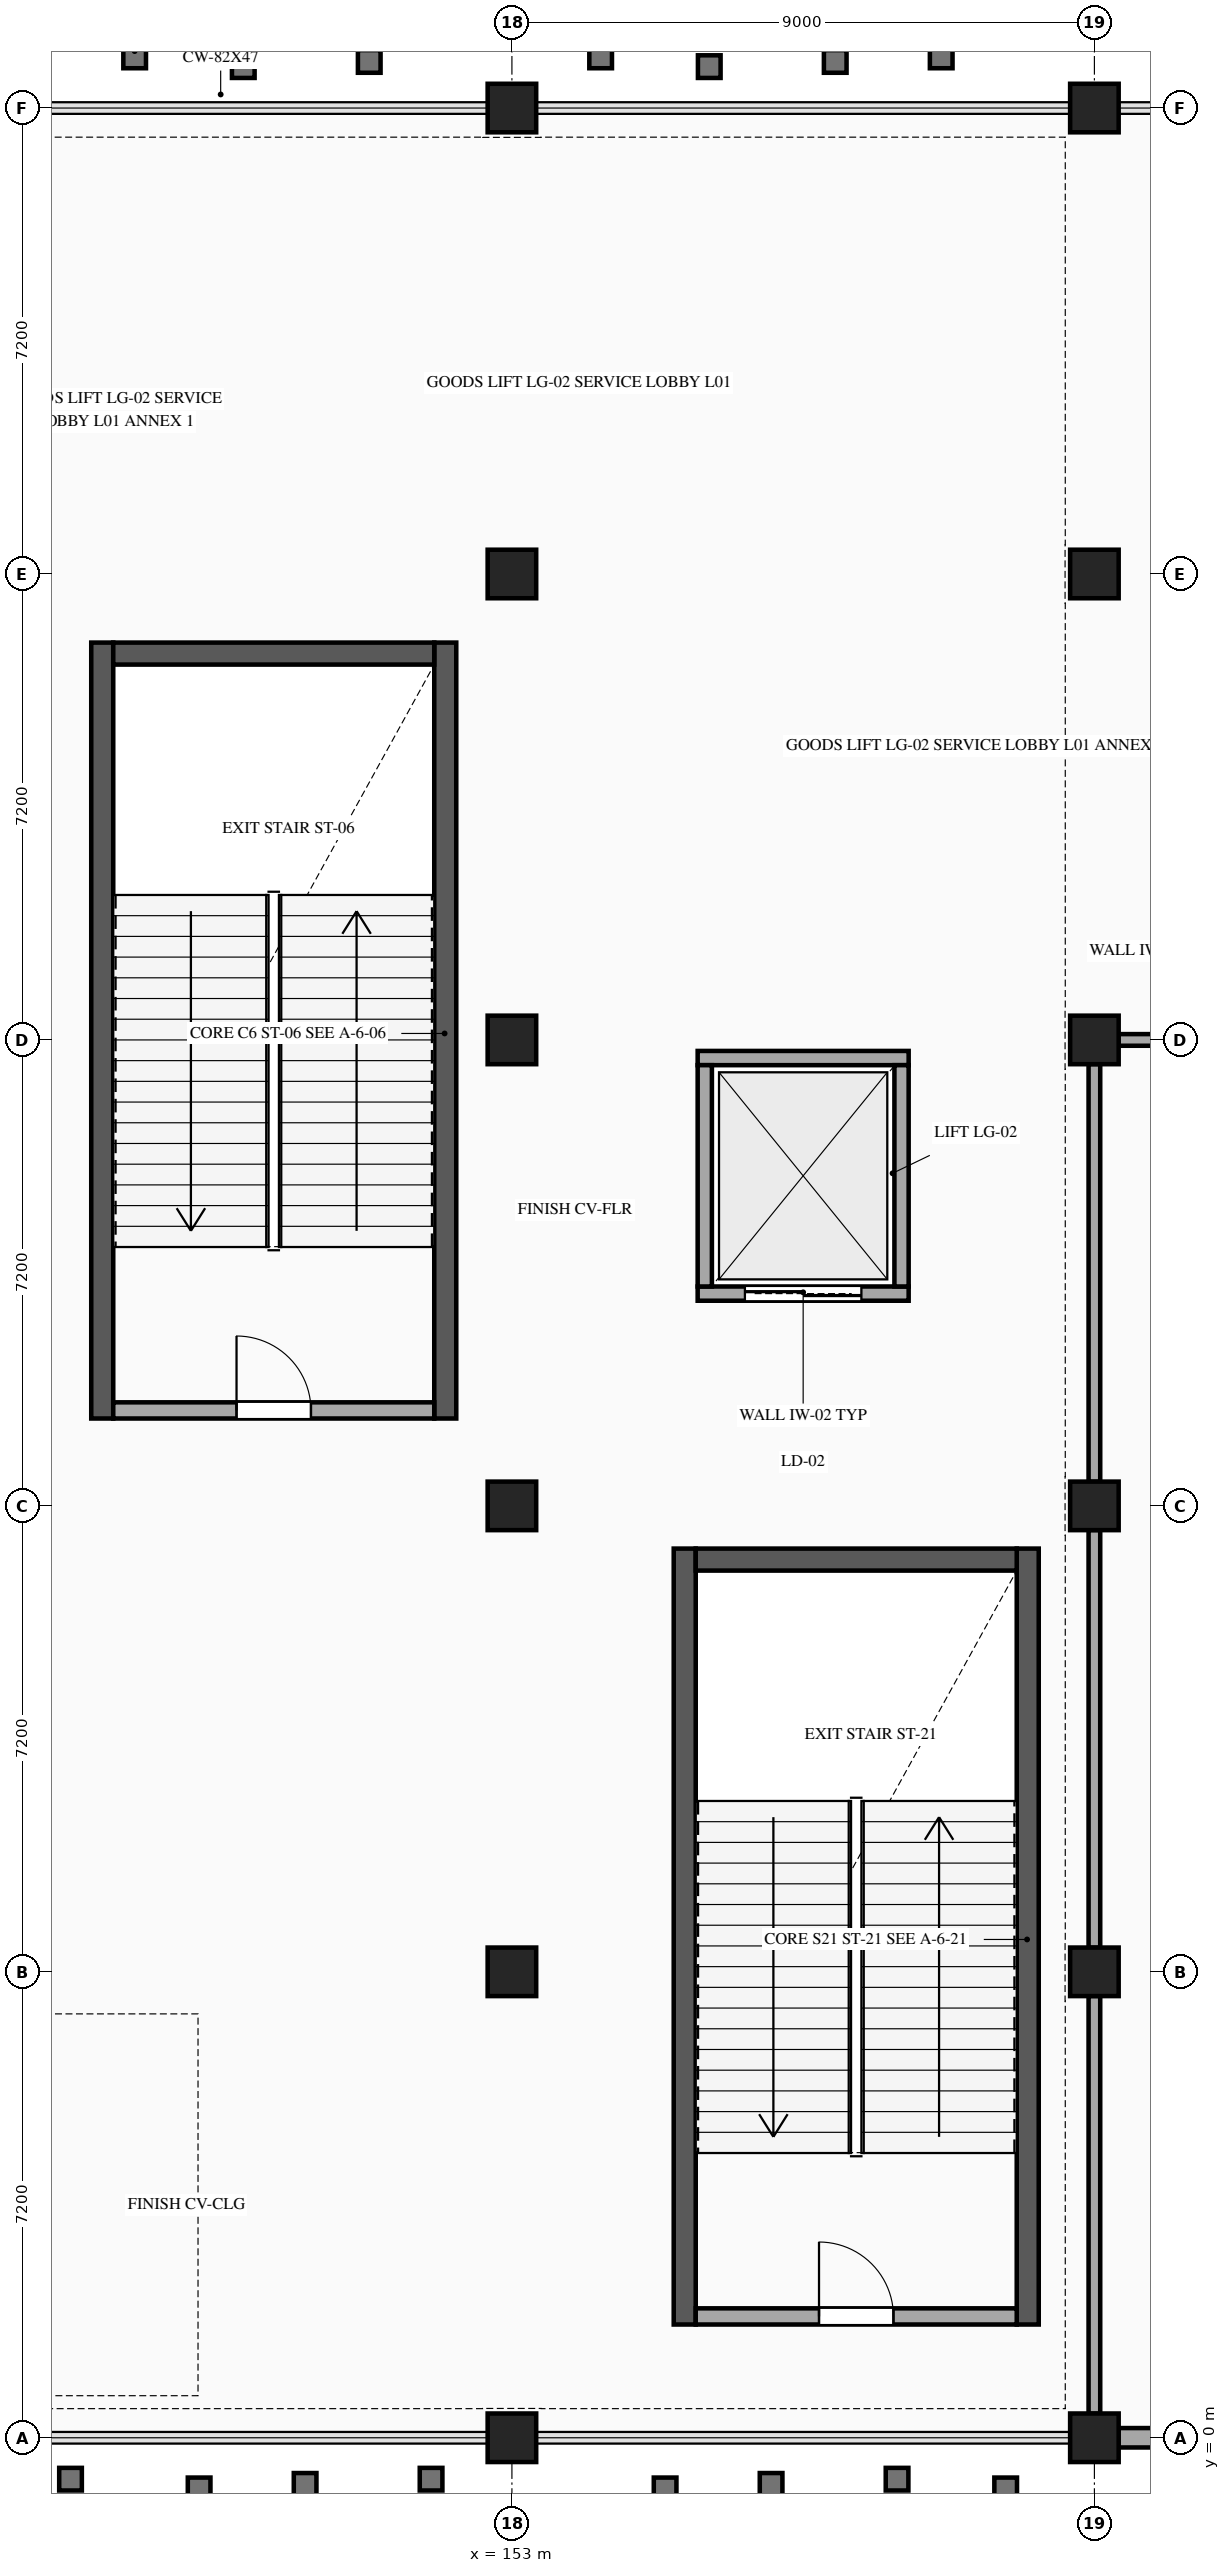
"""IFC4 building model, lengths in metres.
Left out: names, types, materials, properties, quantities, classifications, styles, units other than length and angle.
Written with IfcOpenShell. Run it as: python <this file> out.ifc"""

import sys

from ifc_helpers import new_model, si_unit, direction, frame, frame_2d, origin, origin_2d, place, context, subcontext, project, spatial, rectangle, extrude, element, fill, save


model = new_model("IFC4")
c1 = context("Model", 3, precision=1e-05, world=origin(), true_north=direction((0.0, 1.0)))
c2 = subcontext(c1, "Body", "Model", "MODEL_VIEW")
j1 = project(units=[si_unit("LENGTHUNIT", "METRE"), si_unit("PLANEANGLEUNIT", "RADIAN")], contexts=[c1])
p1 = place(None, origin())
s1 = spatial("IfcSite", under=j1, at=p1, CompositionType="ELEMENT")
p2 = place(p1, origin())
s2 = spatial("IfcBuilding", under=s1, at=p2, CompositionType="ELEMENT")
p3 = place(p2, frame((0.0, 0.0, 5.4)))
s3 = spatial("IfcBuildingStorey", under=s2, at=p3, CompositionType="ELEMENT", Elevation=5.4)
for number, where, z_axis, x_axis in (
    (1, (153.0, 0.0, 0.0), (0.0, 0.0, 1.0), (1.0, 0.0, 0.0)),
    (2, (153.0, 7.2, 0.0), (0.0, 0.0, 1.0), (1.0, 0.0, 0.0)),
    (3, (153.0, 14.4, 0.0), (0.0, 0.0, 1.0), (1.0, 0.0, 0.0)),
    (4, (153.0, 21.6, 0.0), (0.0, 0.0, 1.0), (1.0, 0.0, 0.0)),
    (5, (153.0, 28.8, 0.0), (0.0, 0.0, 1.0), (1.0, 0.0, 0.0)),
    (6, (153.0, 36.0, 0.0), (0.0, 0.0, 1.0), (1.0, 0.0, 0.0)),
    (7, (162.0, 0.0, 0.0), (0.0, 0.0, 1.0), (1.0, 0.0, 0.0)),
    (8, (162.0, 7.2, 0.0), (0.0, 0.0, 1.0), (1.0, 0.0, 0.0)),
    (9, (162.0, 14.4, 0.0), (0.0, 0.0, 1.0), (1.0, 0.0, 0.0)),
    (10, (162.0, 21.6, 0.0), (0.0, 0.0, 1.0), (1.0, 0.0, 0.0)),
    (11, (162.0, 28.8, 0.0), (0.0, 0.0, 1.0), (1.0, 0.0, 0.0)),
    (12, (162.0, 36.0, 0.0), (0.0, 0.0, 1.0), (1.0, 0.0, 0.0)),
):
    element("IfcColumn", number, at=place(p3, frame(where, z_axis=z_axis, x_axis=x_axis)), inside=s3, PredefinedType="COLUMN", context=c2, shape_type="SweptSolid", body=[
        extrude(rectangle(XDim=0.75, YDim=0.75, at=origin_2d()), origin(), (0.0, 0.0, 1.0), 5.4),
    ])
for number, where, z_axis, x_axis in (
    (13, (146.67, 15.75, 0.0), (0.0, 0.0, 1.0), (0.0, 1.0, 0.0)),
    (14, (151.97, 27.74, 0.0), (0.0, 0.0, 1.0), (0.0, -1.0, 0.0)),
):
    element("IfcWall", number, at=place(p3, frame(where, z_axis=z_axis, x_axis=x_axis)), inside=s3, PredefinedType="SHEAR", context=c2, shape_type="SweptSolid", body=[
        extrude(rectangle(XDim=11.99, YDim=0.34, at=frame_2d((5.995, 0.0))), origin(), (0.0, 0.0, 1.0), 5.12),
    ])
p4 = place(p3, frame((146.84, 27.57, 0.0), z_axis=(0.0, 0.0, 1.0), x_axis=(1.0, 0.0, 0.0)))
e15 = element("IfcWall", 15, at=p4, inside=s3, PredefinedType="SHEAR", context=c2, shape_type="SweptSolid", body=[
    extrude(rectangle(XDim=4.96, YDim=0.34, at=frame_2d((2.48, 0.0))), origin(), (0.0, 0.0, 1.0), 5.12),
])
for number, where, z_axis, x_axis in (
    (16, (155.67, 1.75, 0.0), (0.0, 0.0, 1.0), (0.0, 1.0, 0.0)),
    (17, (160.97, 13.74, 0.0), (0.0, 0.0, 1.0), (0.0, -1.0, 0.0)),
):
    element("IfcWall", number, at=place(p3, frame(where, z_axis=z_axis, x_axis=x_axis)), inside=s3, PredefinedType="SHEAR", context=c2, shape_type="SweptSolid", body=[
        extrude(rectangle(XDim=11.99, YDim=0.34, at=frame_2d((5.995, 0.0))), origin(), (0.0, 0.0, 1.0), 5.12),
    ])
p5 = place(p3, frame((155.84, 13.57, 0.0), z_axis=(0.0, 0.0, 1.0), x_axis=(1.0, 0.0, 0.0)))
e18 = element("IfcWall", 18, at=p5, inside=s3, PredefinedType="SHEAR", context=c2, shape_type="SweptSolid", body=[
    extrude(rectangle(XDim=4.96, YDim=0.34, at=frame_2d((2.48, 0.0))), origin(), (0.0, 0.0, 1.0), 5.12),
])
p6 = place(p3, frame((170.627, 0.0, 0.0), z_axis=(0.0, 0.0, 1.0), x_axis=(-1.0, 0.0, 0.0)))
e19 = element("IfcWall", 19, at=p6, inside=s3, PredefinedType="STANDARD", context=c2, shape_type="SweptSolid", body=[
    extrude(rectangle(XDim=8.254, YDim=0.3, at=frame_2d((4.127, 0.0))), origin(), (0.0, 0.0, 1.0), 4.764),
])
p7 = place(p3, frame((146.84, 15.875, 0.0), z_axis=(0.0, 0.0, 1.0), x_axis=(1.0, 0.0, 0.0)))
e20 = element("IfcWall", 20, at=p7, inside=s3, PredefinedType="STANDARD", context=c2, shape_type="SweptSolid", body=[
    extrude(rectangle(XDim=4.96, YDim=0.25, at=frame_2d((2.48, 0.0))), origin(), (0.0, 0.0, 1.0), 5.12),
])
p8 = place(p7, frame((1.905, 0.0, 0.0)))
e21 = element("IfcOpeningElement", 21, at=p8, cuts=e20, PredefinedType="OPENING", context=c2, shape_type="SweptSolid", body=[
    extrude(rectangle(XDim=1.15, YDim=2.2, at=frame_2d((0.575, 1.1))), frame((0.0, 0.135, 0.0), z_axis=(0.0, -1.0, 0.0), x_axis=(1.0, 0.0, 0.0)), (0.0, 0.0, 1.0), 0.27),
])
p9 = place(p3, frame((155.87, 17.68, 0.0), z_axis=(0.0, 0.0, 1.0), x_axis=(1.0, 0.0, 0.0)))
e22 = element("IfcWall", 22, at=p9, inside=s3, PredefinedType="STANDARD", context=c2, shape_type="SweptSolid", body=[
    extrude(rectangle(XDim=3.26, YDim=0.22, at=frame_2d((1.63, 0.0))), origin(), (0.0, 0.0, 1.0), 4.764),
])
p10 = place(p9, frame((0.73, 0.0, 0.0)))
e23 = element("IfcOpeningElement", 23, at=p10, cuts=e22, PredefinedType="OPENING", context=c2, shape_type="SweptSolid", body=[
    extrude(rectangle(XDim=1.8, YDim=2.35, at=frame_2d((0.9, 1.175))), frame((0.0, 0.12, 0.0), z_axis=(0.0, -1.0, 0.0), x_axis=(1.0, 0.0, 0.0)), (0.0, 0.0, 1.0), 0.24),
])
p11 = place(p3, frame((159.13, 21.32, 0.0), z_axis=(0.0, 0.0, 1.0), x_axis=(-1.0, 0.0, 0.0)))
e24 = element("IfcWall", 24, at=p11, inside=s3, PredefinedType="STANDARD", context=c2, shape_type="SweptSolid", body=[
    extrude(rectangle(XDim=3.26, YDim=0.22, at=frame_2d((1.63, 0.0))), origin(), (0.0, 0.0, 1.0), 4.764),
])
for number, where, z_axis, x_axis in (
    (25, (155.98, 21.21, 0.0), (0.0, 0.0, 1.0), (0.0, -1.0, 0.0)),
    (26, (159.02, 17.79, 0.0), (0.0, 0.0, 1.0), (0.0, 1.0, 0.0)),
):
    element("IfcWall", number, at=place(p3, frame(where, z_axis=z_axis, x_axis=x_axis)), inside=s3, PredefinedType="STANDARD", context=c2, shape_type="SweptSolid", body=[
        extrude(rectangle(XDim=3.42, YDim=0.22, at=frame_2d((1.71, 0.0))), origin(), (0.0, 0.0, 1.0), 4.764),
    ])
p12 = place(p3, frame((155.84, 1.875, 0.0), z_axis=(0.0, 0.0, 1.0), x_axis=(1.0, 0.0, 0.0)))
e27 = element("IfcWall", 27, at=p12, inside=s3, PredefinedType="STANDARD", context=c2, shape_type="SweptSolid", body=[
    extrude(rectangle(XDim=4.96, YDim=0.25, at=frame_2d((2.48, 0.0))), origin(), (0.0, 0.0, 1.0), 5.12),
])
p13 = place(p12, frame((1.905, 0.0, 0.0)))
e28 = element("IfcOpeningElement", 28, at=p13, cuts=e27, PredefinedType="OPENING", context=c2, shape_type="SweptSolid", body=[
    extrude(rectangle(XDim=1.15, YDim=2.2, at=frame_2d((0.575, 1.1))), frame((0.0, 0.135, 0.0), z_axis=(0.0, -1.0, 0.0), x_axis=(1.0, 0.0, 0.0)), (0.0, 0.0, 1.0), 0.27),
])
p14 = place(p3, frame((162.373, 21.6, 0.0), z_axis=(0.0, 0.0, 1.0), x_axis=(1.0, 0.0, 0.0)))
e29 = element("IfcWall", 29, at=p14, inside=s3, PredefinedType="PARTITIONING", context=c2, shape_type="SweptSolid", body=[
    extrude(rectangle(XDim=3.627, YDim=0.18, at=frame_2d((1.813, 0.0))), origin(), (0.0, 0.0, 1.0), 4.264),
])
p15 = place(p14, frame((1.513, 0.0, 0.0)))
e30 = element("IfcOpeningElement", 30, at=p15, cuts=e29, PredefinedType="OPENING", context=c2, shape_type="SweptSolid", body=[
    extrude(rectangle(XDim=1.3, YDim=2.2, at=frame_2d((0.65, 1.1))), frame((0.0, 0.1, 0.0), z_axis=(0.0, -1.0, 0.0), x_axis=(1.0, 0.0, 0.0)), (0.0, 0.0, 1.0), 0.2),
])
p16 = place(p3, frame((162.0, 0.373, 0.0), z_axis=(0.0, 0.0, 1.0), x_axis=(0.0, 1.0, 0.0)))
e31 = element("IfcWall", 31, at=p16, inside=s3, PredefinedType="PARTITIONING", context=c2, shape_type="SweptSolid", body=[
    extrude(rectangle(XDim=6.454, YDim=0.18, at=frame_2d((3.227, 0.0))), origin(), (0.0, 0.0, 1.0), 4.264),
])
for number, where, z_axis, x_axis in (
    (32, (162.0, 7.573, 0.0), (0.0, 0.0, 1.0), (0.0, 1.0, 0.0)),
    (33, (162.0, 14.773, 0.0), (0.0, 0.0, 1.0), (0.0, 1.0, 0.0)),
):
    element("IfcWall", number, at=place(p3, frame(where, z_axis=z_axis, x_axis=x_axis)), inside=s3, PredefinedType="PARTITIONING", context=c2, shape_type="SweptSolid", body=[
        extrude(rectangle(XDim=6.454, YDim=0.18, at=frame_2d((3.227, 0.0))), origin(), (0.0, 0.0, 1.0), 4.264),
    ])
p17 = place(p8, origin())
e34 = element("IfcDoor", 34, at=p17, inside=s3, OperationType="SINGLE_SWING_LEFT", PredefinedType="DOOR", context=c2, shape_type="SweptSolid", body=[
    extrude(rectangle(XDim=1.15, YDim=2.2, at=frame_2d((0.575, 1.1))), frame((0.0, 0.025, 0.0), z_axis=(0.0, -1.0, 0.0), x_axis=(1.0, 0.0, 0.0)), (0.0, 0.0, 1.0), 0.05),
])
fill(e21, e34)
p18 = place(p10, origin())
e35 = element("IfcDoor", 35, at=p18, inside=s3, OperationType="DOUBLE_DOOR_SLIDING", PredefinedType="DOOR", context=c2, shape_type="SweptSolid", body=[
    extrude(rectangle(XDim=1.8, YDim=2.35, at=frame_2d((0.9, 1.175))), frame((0.0, 0.025, 0.0), z_axis=(0.0, -1.0, 0.0), x_axis=(1.0, 0.0, 0.0)), (0.0, 0.0, 1.0), 0.05),
])
fill(e23, e35)
p19 = place(p13, origin())
e36 = element("IfcDoor", 36, at=p19, inside=s3, OperationType="SINGLE_SWING_LEFT", PredefinedType="DOOR", context=c2, shape_type="SweptSolid", body=[
    extrude(rectangle(XDim=1.15, YDim=2.2, at=frame_2d((0.575, 1.1))), frame((0.0, 0.025, 0.0), z_axis=(0.0, -1.0, 0.0), x_axis=(1.0, 0.0, 0.0)), (0.0, 0.0, 1.0), 0.05),
])
fill(e28, e36)
save(model, sys.argv[1])
